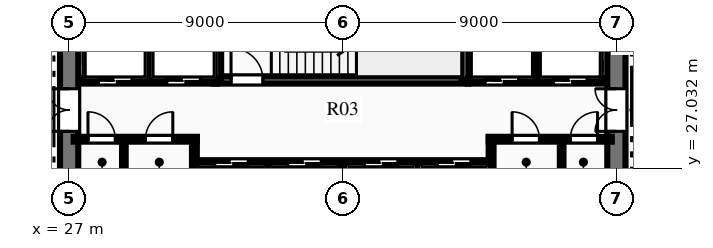
"""IFC4 building model, lengths in metres.
Left out: names, types, materials, properties, quantities, classifications, styles, units other than length and angle.
Written with IfcOpenShell. Run it as: python <this file> out.ifc"""

import sys

from ifc_helpers import new_model, si_unit, direction, frame, frame_2d, origin, place, context, subcontext, project, spatial, rectangle, extrude, element, fill, save


model = new_model("IFC4")
c1 = context("Model", 3, precision=1e-05, world=origin(), true_north=direction((0.0, 1.0)))
c2 = subcontext(c1, "Body", "Model", "MODEL_VIEW")
j1 = project(units=[si_unit("LENGTHUNIT", "METRE"), si_unit("PLANEANGLEUNIT", "RADIAN")], contexts=[c1])
p1 = place(None, origin())
s1 = spatial("IfcSite", under=j1, at=p1, CompositionType="ELEMENT")
p2 = place(p1, origin())
s2 = spatial("IfcBuilding", under=s1, at=p2, CompositionType="ELEMENT")
p3 = place(p2, frame((0.0, 0.0, 40.2)))
s3 = spatial("IfcBuildingStorey", under=s2, at=p3, CompositionType="ELEMENT", Elevation=40.2)
p4 = place(p3, frame((27.0, 18.3, 0.0), z_axis=(0.0, 0.0, 1.0), x_axis=(0.0, 1.0, 0.0)))
e1 = element("IfcWall", 1, at=p4, inside=s3, PredefinedType="SHEAR", context=c2, shape_type="SweptSolid", body=[
    extrude(rectangle(XDim=15.4, YDim=0.6, at=frame_2d((7.7, 0.0))), origin(), (0.0, 0.0, 1.0), 3.75),
])
p5 = place(p4, frame((9.94, 0.0, 0.0)))
e2 = element("IfcOpeningElement", 2, at=p5, cuts=e1, PredefinedType="OPENING", context=c2, shape_type="SweptSolid", body=[
    extrude(rectangle(XDim=1.4, YDim=2.2, at=frame_2d((0.7, 1.1))), frame((0.0, 0.31, 0.0), z_axis=(0.0, -1.0, 0.0), x_axis=(1.0, 0.0, 0.0)), (0.0, 0.0, 1.0), 0.62),
])
p6 = place(p3, frame((45.0, 18.3, 0.0), z_axis=(0.0, 0.0, 1.0), x_axis=(0.0, 1.0, 0.0)))
e3 = element("IfcWall", 3, at=p6, inside=s3, PredefinedType="SHEAR", context=c2, shape_type="SweptSolid", body=[
    extrude(rectangle(XDim=15.4, YDim=0.6, at=frame_2d((7.7, 0.0))), origin(), (0.0, 0.0, 1.0), 3.75),
])
p7 = place(p6, frame((9.94, 0.0, 0.0)))
e4 = element("IfcOpeningElement", 4, at=p7, cuts=e3, PredefinedType="OPENING", context=c2, shape_type="SweptSolid", body=[
    extrude(rectangle(XDim=1.4, YDim=2.2, at=frame_2d((0.7, 1.1))), frame((0.0, 0.31, 0.0), z_axis=(0.0, -1.0, 0.0), x_axis=(1.0, 0.0, 0.0)), (0.0, 0.0, 1.0), 0.62),
])
p8 = place(p3, frame((31.76, 29.93, 0.0), z_axis=(0.0, 0.0, 1.0), x_axis=(1.0, 0.0, 0.0)))
e5 = element("IfcWall", 5, at=p8, inside=s3, PredefinedType="SHEAR", context=c2, shape_type="SweptSolid", body=[
    extrude(rectangle(XDim=8.38, YDim=0.24, at=frame_2d((4.19, 0.0))), origin(), (0.0, 0.0, 1.0), 3.75),
])
p9 = place(p8, frame((0.565, 0.0, 0.0)))
e6 = element("IfcOpeningElement", 6, at=p9, cuts=e5, PredefinedType="OPENING", context=c2, shape_type="SweptSolid", body=[
    extrude(rectangle(XDim=1.05, YDim=2.15, at=frame_2d((0.525, 1.075))), frame((0.0, 0.13, 0.0), z_axis=(0.0, -1.0, 0.0), x_axis=(1.0, 0.0, 0.0)), (0.0, 0.0, 1.0), 0.26),
])
p10 = place(p3, frame((31.88, 29.93, 0.0), z_axis=(0.0, 0.0, 1.0), x_axis=(0.0, 1.0, 0.0)))
e7 = element("IfcWall", 7, at=p10, inside=s3, PredefinedType="SHEAR", context=c2, shape_type="SweptSolid", body=[
    extrude(rectangle(XDim=3.79, YDim=0.24, at=frame_2d((1.895, 0.0))), origin(), (0.0, 0.0, 1.0), 3.75),
])
p11 = place(p3, frame((40.02, 29.93, 0.0), z_axis=(0.0, 0.0, 1.0), x_axis=(0.0, 1.0, 0.0)))
e8 = element("IfcWall", 8, at=p11, inside=s3, PredefinedType="SHEAR", context=c2, shape_type="SweptSolid", body=[
    extrude(rectangle(XDim=3.85, YDim=0.24, at=frame_2d((1.925, 0.0))), origin(), (0.0, 0.0, 1.0), 3.75),
])
p12 = place(p3, frame((27.15, 27.98, 0.0), z_axis=(0.0, 0.0, 1.0), x_axis=(1.0, 0.0, 0.0)))
e9 = element("IfcWall", 9, at=p12, inside=s3, PredefinedType="PARTITIONING", context=c2, shape_type="SweptSolid", body=[
    extrude(rectangle(XDim=4.05, YDim=0.16, at=frame_2d((2.025, 0.0))), origin(), (0.0, 0.0, 1.0), 3.44),
])
p13 = place(p12, frame((0.47, 0.0, 0.0)))
e10 = element("IfcOpeningElement", 10, at=p13, cuts=e9, PredefinedType="OPENING", context=c2, shape_type="SweptSolid", body=[
    extrude(rectangle(XDim=0.9, YDim=2.15, at=frame_2d((0.45, 1.075))), frame((0.0, 0.09, 0.0), z_axis=(0.0, -1.0, 0.0), x_axis=(1.0, 0.0, 0.0)), (0.0, 0.0, 1.0), 0.18),
])
p14 = place(p12, frame((2.36, 0.0, 0.0)))
e11 = element("IfcOpeningElement", 11, at=p14, cuts=e9, PredefinedType="OPENING", context=c2, shape_type="SweptSolid", body=[
    extrude(rectangle(XDim=0.9, YDim=2.15, at=frame_2d((0.45, 1.075))), frame((0.0, 0.09, 0.0), z_axis=(0.0, -1.0, 0.0), x_axis=(1.0, 0.0, 0.0)), (0.0, 0.0, 1.0), 0.18),
])
p15 = place(p3, frame((31.12, 26.54, 0.0), z_axis=(0.0, 0.0, 1.0), x_axis=(0.0, 1.0, 0.0)))
e12 = element("IfcWall", 12, at=p15, inside=s3, PredefinedType="PARTITIONING", context=c2, shape_type="SweptSolid", body=[
    extrude(rectangle(XDim=1.51, YDim=0.16, at=frame_2d((0.755, 0.0))), origin(), (0.0, 0.0, 1.0), 3.44),
])
p16 = place(p3, frame((40.8, 27.98, 0.0), z_axis=(0.0, 0.0, 1.0), x_axis=(1.0, 0.0, 0.0)))
e13 = element("IfcWall", 13, at=p16, inside=s3, PredefinedType="PARTITIONING", context=c2, shape_type="SweptSolid", body=[
    extrude(rectangle(XDim=4.05, YDim=0.16, at=frame_2d((2.025, 0.0))), origin(), (0.0, 0.0, 1.0), 3.44),
])
p17 = place(p16, frame((0.77, 0.0, 0.0)))
e14 = element("IfcOpeningElement", 14, at=p17, cuts=e13, PredefinedType="OPENING", context=c2, shape_type="SweptSolid", body=[
    extrude(rectangle(XDim=0.9, YDim=2.15, at=frame_2d((0.45, 1.075))), frame((0.0, 0.09, 0.0), z_axis=(0.0, -1.0, 0.0), x_axis=(1.0, 0.0, 0.0)), (0.0, 0.0, 1.0), 0.18),
])
p18 = place(p16, frame((2.68, 0.0, 0.0)))
e15 = element("IfcOpeningElement", 15, at=p18, cuts=e13, PredefinedType="OPENING", context=c2, shape_type="SweptSolid", body=[
    extrude(rectangle(XDim=0.9, YDim=2.15, at=frame_2d((0.45, 1.075))), frame((0.0, 0.09, 0.0), z_axis=(0.0, -1.0, 0.0), x_axis=(1.0, 0.0, 0.0)), (0.0, 0.0, 1.0), 0.18),
])
p19 = place(p3, frame((40.88, 26.54, 0.0), z_axis=(0.0, 0.0, 1.0), x_axis=(0.0, 1.0, 0.0)))
e16 = element("IfcWall", 16, at=p19, inside=s3, PredefinedType="PARTITIONING", context=c2, shape_type="SweptSolid", body=[
    extrude(rectangle(XDim=1.51, YDim=0.16, at=frame_2d((0.755, 0.0))), origin(), (0.0, 0.0, 1.0), 3.44),
])
for number, where, z_axis, x_axis in (
    (17, (28.8, 26.54, 0.0), (0.0, 0.0, 1.0), (0.0, 1.0, 0.0)),
    (18, (43.2, 26.54, 0.0), (0.0, 0.0, 1.0), (0.0, 1.0, 0.0)),
):
    element("IfcWall", number, at=place(p3, frame(where, z_axis=z_axis, x_axis=x_axis)), inside=s3, PredefinedType="PARTITIONING", context=c2, shape_type="SweptSolid", body=[
        extrude(rectangle(XDim=1.44, YDim=0.12, at=frame_2d((0.72, 0.0))), origin(), (0.0, 0.0, 1.0), 3.44),
    ])
p20 = place(p3, frame((27.45, 29.9, 0.0), z_axis=(0.0, 0.0, 1.0), x_axis=(1.0, 0.0, 0.0)))
e19 = element("IfcWall", 19, at=p20, inside=s3, PredefinedType="PARTITIONING", context=c2, shape_type="SweptSolid", body=[
    extrude(rectangle(XDim=4.43, YDim=0.18, at=frame_2d((2.215, 0.0))), origin(), (0.0, 0.0, 1.0), 3.44),
])
p21 = place(p20, frame((0.515, 0.0, 0.0)))
e20 = element("IfcOpeningElement", 20, at=p21, cuts=e19, PredefinedType="OPENING", context=c2, shape_type="SweptSolid", body=[
    extrude(rectangle(XDim=1.1, YDim=2.15, at=frame_2d((0.55, 1.075))), frame((0.0, 0.1, 0.0), z_axis=(0.0, -1.0, 0.0), x_axis=(1.0, 0.0, 0.0)), (0.0, 0.0, 1.0), 0.2),
])
p22 = place(p20, frame((2.765, 0.0, 0.0)))
e21 = element("IfcOpeningElement", 21, at=p22, cuts=e19, PredefinedType="OPENING", context=c2, shape_type="SweptSolid", body=[
    extrude(rectangle(XDim=1.1, YDim=2.15, at=frame_2d((0.55, 1.075))), frame((0.0, 0.1, 0.0), z_axis=(0.0, -1.0, 0.0), x_axis=(1.0, 0.0, 0.0)), (0.0, 0.0, 1.0), 0.2),
])
p23 = place(p3, frame((29.63, 29.9, 0.0), z_axis=(0.0, 0.0, 1.0), x_axis=(0.0, 1.0, 0.0)))
e22 = element("IfcWall", 22, at=p23, inside=s3, PredefinedType="PARTITIONING", context=c2, shape_type="SweptSolid", body=[
    extrude(rectangle(XDim=3.75, YDim=0.18, at=frame_2d((1.875, 0.0))), origin(), (0.0, 0.0, 1.0), 3.44),
])
p24 = place(p3, frame((40.12, 29.9, 0.0), z_axis=(0.0, 0.0, 1.0), x_axis=(1.0, 0.0, 0.0)))
e23 = element("IfcWall", 23, at=p24, inside=s3, PredefinedType="PARTITIONING", context=c2, shape_type="SweptSolid", body=[
    extrude(rectangle(XDim=4.43, YDim=0.18, at=frame_2d((2.215, 0.0))), origin(), (0.0, 0.0, 1.0), 3.44),
])
p25 = place(p24, frame((0.565, 0.0, 0.0)))
e24 = element("IfcOpeningElement", 24, at=p25, cuts=e23, PredefinedType="OPENING", context=c2, shape_type="SweptSolid", body=[
    extrude(rectangle(XDim=1.1, YDim=2.15, at=frame_2d((0.55, 1.075))), frame((0.0, 0.1, 0.0), z_axis=(0.0, -1.0, 0.0), x_axis=(1.0, 0.0, 0.0)), (0.0, 0.0, 1.0), 0.2),
])
p26 = place(p24, frame((2.815, 0.0, 0.0)))
e25 = element("IfcOpeningElement", 25, at=p26, cuts=e23, PredefinedType="OPENING", context=c2, shape_type="SweptSolid", body=[
    extrude(rectangle(XDim=1.1, YDim=2.15, at=frame_2d((0.55, 1.075))), frame((0.0, 0.1, 0.0), z_axis=(0.0, -1.0, 0.0), x_axis=(1.0, 0.0, 0.0)), (0.0, 0.0, 1.0), 0.2),
])
p27 = place(p3, frame((42.37, 29.9, 0.0), z_axis=(0.0, 0.0, 1.0), x_axis=(0.0, 1.0, 0.0)))
e26 = element("IfcWall", 26, at=p27, inside=s3, PredefinedType="PARTITIONING", context=c2, shape_type="SweptSolid", body=[
    extrude(rectangle(XDim=3.75, YDim=0.18, at=frame_2d((1.875, 0.0))), origin(), (0.0, 0.0, 1.0), 3.44),
])
p28 = place(p3, frame((31.2, 27.2, 0.0), z_axis=(0.0, 0.0, 1.0), x_axis=(1.0, 0.0, 0.0)))
e27 = element("IfcWall", 27, at=p28, inside=s3, PredefinedType="PARTITIONING", context=c2, shape_type="SweptSolid", body=[
    extrude(rectangle(XDim=9.6, YDim=0.18, at=frame_2d((4.8, 0.0))), origin(), (0.0, 0.0, 1.0), 3.44),
])
p29 = place(p28, frame((0.59, 0.0, 0.0)))
e28 = element("IfcOpeningElement", 28, at=p29, cuts=e27, PredefinedType="OPENING", context=c2, shape_type="SweptSolid", body=[
    extrude(rectangle(XDim=1.1, YDim=2.15, at=frame_2d((0.55, 1.075))), frame((0.0, 0.1, 0.0), z_axis=(0.0, -1.0, 0.0), x_axis=(1.0, 0.0, 0.0)), (0.0, 0.0, 1.0), 0.2),
])
p30 = place(p28, frame((2.99, 0.0, 0.0)))
e29 = element("IfcOpeningElement", 29, at=p30, cuts=e27, PredefinedType="OPENING", context=c2, shape_type="SweptSolid", body=[
    extrude(rectangle(XDim=1.1, YDim=2.15, at=frame_2d((0.55, 1.075))), frame((0.0, 0.1, 0.0), z_axis=(0.0, -1.0, 0.0), x_axis=(1.0, 0.0, 0.0)), (0.0, 0.0, 1.0), 0.2),
])
p31 = place(p28, frame((5.51, 0.0, 0.0)))
e30 = element("IfcOpeningElement", 30, at=p31, cuts=e27, PredefinedType="OPENING", context=c2, shape_type="SweptSolid", body=[
    extrude(rectangle(XDim=1.1, YDim=2.15, at=frame_2d((0.55, 1.075))), frame((0.0, 0.1, 0.0), z_axis=(0.0, -1.0, 0.0), x_axis=(1.0, 0.0, 0.0)), (0.0, 0.0, 1.0), 0.2),
])
p32 = place(p28, frame((7.91, 0.0, 0.0)))
e31 = element("IfcOpeningElement", 31, at=p32, cuts=e27, PredefinedType="OPENING", context=c2, shape_type="SweptSolid", body=[
    extrude(rectangle(XDim=1.1, YDim=2.15, at=frame_2d((0.55, 1.075))), frame((0.0, 0.1, 0.0), z_axis=(0.0, -1.0, 0.0), x_axis=(1.0, 0.0, 0.0)), (0.0, 0.0, 1.0), 0.2),
])
for number, where, z_axis, x_axis in (
    (32, (33.54, 25.3, 0.0), (0.0, 0.0, 1.0), (0.0, 1.0, 0.0)),
    (33, (36.0, 25.3, 0.0), (0.0, 0.0, 1.0), (0.0, 1.0, 0.0)),
    (34, (38.46, 25.3, 0.0), (0.0, 0.0, 1.0), (0.0, 1.0, 0.0)),
):
    element("IfcWall", number, at=place(p3, frame(where, z_axis=z_axis, x_axis=x_axis)), inside=s3, PredefinedType="PARTITIONING", context=c2, shape_type="SweptSolid", body=[
        extrude(rectangle(XDim=1.9, YDim=0.18, at=frame_2d((0.95, 0.0))), origin(), (0.0, 0.0, 1.0), 3.44),
    ])
p33 = place(p13, origin())
e35 = element("IfcDoor", 35, at=p33, inside=s3, OperationType="SINGLE_SWING_LEFT", PredefinedType="DOOR", context=c2, shape_type="SweptSolid", body=[
    extrude(rectangle(XDim=0.9, YDim=2.15, at=frame_2d((0.45, 1.075))), frame((0.0, 0.025, 0.0), z_axis=(0.0, -1.0, 0.0), x_axis=(1.0, 0.0, 0.0)), (0.0, 0.0, 1.0), 0.05),
])
fill(e10, e35)
p34 = place(p14, origin())
e36 = element("IfcDoor", 36, at=p34, inside=s3, OperationType="SINGLE_SWING_RIGHT", PredefinedType="DOOR", context=c2, shape_type="SweptSolid", body=[
    extrude(rectangle(XDim=0.9, YDim=2.15, at=frame_2d((0.45, 1.075))), frame((0.0, 0.025, 0.0), z_axis=(0.0, -1.0, 0.0), x_axis=(1.0, 0.0, 0.0)), (0.0, 0.0, 1.0), 0.05),
])
fill(e11, e36)
p35 = place(p17, origin())
e37 = element("IfcDoor", 37, at=p35, inside=s3, OperationType="SINGLE_SWING_LEFT", PredefinedType="DOOR", context=c2, shape_type="SweptSolid", body=[
    extrude(rectangle(XDim=0.9, YDim=2.15, at=frame_2d((0.45, 1.075))), frame((0.0, 0.025, 0.0), z_axis=(0.0, -1.0, 0.0), x_axis=(1.0, 0.0, 0.0)), (0.0, 0.0, 1.0), 0.05),
])
fill(e14, e37)
p36 = place(p18, origin())
e38 = element("IfcDoor", 38, at=p36, inside=s3, OperationType="SINGLE_SWING_RIGHT", PredefinedType="DOOR", context=c2, shape_type="SweptSolid", body=[
    extrude(rectangle(XDim=0.9, YDim=2.15, at=frame_2d((0.45, 1.075))), frame((0.0, 0.025, 0.0), z_axis=(0.0, -1.0, 0.0), x_axis=(1.0, 0.0, 0.0)), (0.0, 0.0, 1.0), 0.05),
])
fill(e15, e38)
p37 = place(p9, origin())
e39 = element("IfcDoor", 39, at=p37, inside=s3, OperationType="SINGLE_SWING_LEFT", PredefinedType="DOOR", context=c2, shape_type="SweptSolid", body=[
    extrude(rectangle(XDim=1.05, YDim=2.15, at=frame_2d((0.525, 1.075))), frame((0.0, 0.025, 0.0), z_axis=(0.0, -1.0, 0.0), x_axis=(1.0, 0.0, 0.0)), (0.0, 0.0, 1.0), 0.05),
])
fill(e6, e39)
p38 = place(p5, origin())
e40 = element("IfcDoor", 40, at=p38, inside=s3, OperationType="DOUBLE_DOOR_SINGLE_SWING", PredefinedType="DOOR", context=c2, shape_type="SweptSolid", body=[
    extrude(rectangle(XDim=1.4, YDim=2.2, at=frame_2d((0.7, 1.1))), frame((0.0, 0.025, 0.0), z_axis=(0.0, -1.0, 0.0), x_axis=(1.0, 0.0, 0.0)), (0.0, 0.0, 1.0), 0.05),
])
fill(e2, e40)
p39 = place(p7, origin())
e41 = element("IfcDoor", 41, at=p39, inside=s3, OperationType="DOUBLE_DOOR_SINGLE_SWING", PredefinedType="DOOR", context=c2, shape_type="SweptSolid", body=[
    extrude(rectangle(XDim=1.4, YDim=2.2, at=frame_2d((0.7, 1.1))), frame((0.0, 0.025, 0.0), z_axis=(0.0, -1.0, 0.0), x_axis=(1.0, 0.0, 0.0)), (0.0, 0.0, 1.0), 0.05),
])
fill(e4, e41)
p40 = place(p21, origin())
e42 = element("IfcDoor", 42, at=p40, inside=s3, OperationType="SLIDING_TO_LEFT", PredefinedType="DOOR", context=c2, shape_type="SweptSolid", body=[
    extrude(rectangle(XDim=1.1, YDim=2.15, at=frame_2d((0.55, 1.075))), frame((0.0, 0.025, 0.0), z_axis=(0.0, -1.0, 0.0), x_axis=(1.0, 0.0, 0.0)), (0.0, 0.0, 1.0), 0.05),
])
fill(e20, e42)
p41 = place(p22, origin())
e43 = element("IfcDoor", 43, at=p41, inside=s3, OperationType="SLIDING_TO_LEFT", PredefinedType="DOOR", context=c2, shape_type="SweptSolid", body=[
    extrude(rectangle(XDim=1.1, YDim=2.15, at=frame_2d((0.55, 1.075))), frame((0.0, 0.025, 0.0), z_axis=(0.0, -1.0, 0.0), x_axis=(1.0, 0.0, 0.0)), (0.0, 0.0, 1.0), 0.05),
])
fill(e21, e43)
p42 = place(p25, origin())
e44 = element("IfcDoor", 44, at=p42, inside=s3, OperationType="SLIDING_TO_LEFT", PredefinedType="DOOR", context=c2, shape_type="SweptSolid", body=[
    extrude(rectangle(XDim=1.1, YDim=2.15, at=frame_2d((0.55, 1.075))), frame((0.0, 0.025, 0.0), z_axis=(0.0, -1.0, 0.0), x_axis=(1.0, 0.0, 0.0)), (0.0, 0.0, 1.0), 0.05),
])
fill(e24, e44)
p43 = place(p26, origin())
e45 = element("IfcDoor", 45, at=p43, inside=s3, OperationType="SLIDING_TO_LEFT", PredefinedType="DOOR", context=c2, shape_type="SweptSolid", body=[
    extrude(rectangle(XDim=1.1, YDim=2.15, at=frame_2d((0.55, 1.075))), frame((0.0, 0.025, 0.0), z_axis=(0.0, -1.0, 0.0), x_axis=(1.0, 0.0, 0.0)), (0.0, 0.0, 1.0), 0.05),
])
fill(e25, e45)
p44 = place(p29, origin())
e46 = element("IfcDoor", 46, at=p44, inside=s3, OperationType="SLIDING_TO_LEFT", PredefinedType="DOOR", context=c2, shape_type="SweptSolid", body=[
    extrude(rectangle(XDim=1.1, YDim=2.15, at=frame_2d((0.55, 1.075))), frame((0.0, 0.025, 0.0), z_axis=(0.0, -1.0, 0.0), x_axis=(1.0, 0.0, 0.0)), (0.0, 0.0, 1.0), 0.05),
])
fill(e28, e46)
p45 = place(p30, origin())
e47 = element("IfcDoor", 47, at=p45, inside=s3, OperationType="SLIDING_TO_LEFT", PredefinedType="DOOR", context=c2, shape_type="SweptSolid", body=[
    extrude(rectangle(XDim=1.1, YDim=2.15, at=frame_2d((0.55, 1.075))), frame((0.0, 0.025, 0.0), z_axis=(0.0, -1.0, 0.0), x_axis=(1.0, 0.0, 0.0)), (0.0, 0.0, 1.0), 0.05),
])
fill(e29, e47)
p46 = place(p31, origin())
e48 = element("IfcDoor", 48, at=p46, inside=s3, OperationType="SLIDING_TO_LEFT", PredefinedType="DOOR", context=c2, shape_type="SweptSolid", body=[
    extrude(rectangle(XDim=1.1, YDim=2.15, at=frame_2d((0.55, 1.075))), frame((0.0, 0.025, 0.0), z_axis=(0.0, -1.0, 0.0), x_axis=(1.0, 0.0, 0.0)), (0.0, 0.0, 1.0), 0.05),
])
fill(e30, e48)
p47 = place(p32, origin())
e49 = element("IfcDoor", 49, at=p47, inside=s3, OperationType="SLIDING_TO_LEFT", PredefinedType="DOOR", context=c2, shape_type="SweptSolid", body=[
    extrude(rectangle(XDim=1.1, YDim=2.15, at=frame_2d((0.55, 1.075))), frame((0.0, 0.025, 0.0), z_axis=(0.0, -1.0, 0.0), x_axis=(1.0, 0.0, 0.0)), (0.0, 0.0, 1.0), 0.05),
])
fill(e31, e49)
save(model, sys.argv[1])
